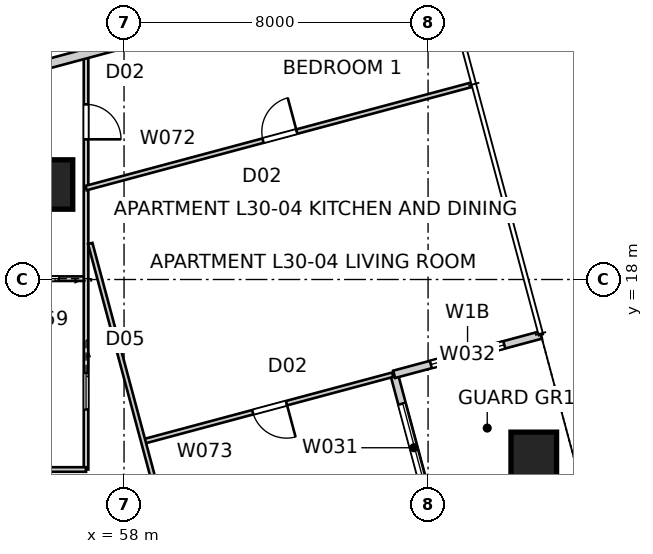
"""IFC4 building model, lengths in metres.
Left out: names, types, materials, properties, quantities, classifications, styles, units other than length and angle.
Written with IfcOpenShell. Run it as: python <this file> out.ifc"""

import sys

from ifc_helpers import new_model, si_unit, direction, frame, frame_2d, origin, origin_2d, place, context, subcontext, project, spatial, rectangle, extrude, element, fill, save


model = new_model("IFC4")
c1 = context("Model", 3, precision=1e-05, world=origin(), true_north=direction((0.0, 1.0)))
c2 = subcontext(c1, "Body", "Model", "MODEL_VIEW")
j1 = project(units=[si_unit("LENGTHUNIT", "METRE"), si_unit("PLANEANGLEUNIT", "RADIAN")], contexts=[c1])
p1 = place(None, origin())
s1 = spatial("IfcSite", under=j1, at=p1, CompositionType="ELEMENT")
p2 = place(p1, origin())
s2 = spatial("IfcBuilding", under=s1, at=p2, CompositionType="ELEMENT")
p3 = place(p2, frame((0.0, 0.0, 111.6)))
s3 = spatial("IfcBuildingStorey", under=s2, at=p3, CompositionType="ELEMENT", Elevation=111.6)
p4 = place(p3, frame((68.781, 13.383, -0.15), z_axis=(0.0, 0.0, 1.0), x_axis=(1.0, 0.0, 0.0)))
e1 = element("IfcColumn", 1, at=p4, inside=s3, PredefinedType="COLUMN", context=c2, shape_type="SweptSolid", body=[
    extrude(rectangle(XDim=1.2, YDim=1.2, at=origin_2d()), origin(), (0.0, 0.0, 1.0), 3.55),
])
p5 = place(p3, frame((56.0, 20.5, 0.0), z_axis=(0.0, 0.0, 1.0), x_axis=(1.0, 0.0, 0.0)))
e2 = element("IfcColumn", 2, at=p5, inside=s3, PredefinedType="COLUMN", context=c2, shape_type="SweptSolid", body=[
    extrude(rectangle(XDim=1.3, YDim=1.3, at=origin_2d()), origin(), (0.0, 0.0, 1.0), 3.4),
])
p6 = place(p3, frame((66.143, 11.641, 0.0), z_axis=(0.0, 0.0, 1.0), x_axis=(-0.258843877716, 0.965919172068, 0.0)))
e3 = element("IfcWall", 3, at=p6, inside=s3, PredefinedType="SOLIDWALL", context=c2, shape_type="SweptSolid", body=[
    extrude(rectangle(XDim=4.0, YDim=0.2, at=frame_2d((2.0, 0.0))), origin(), (0.0, 0.0, 1.0), 3.25),
])
p7 = place(p6, frame((0.8, 0.0, 0.0)))
e4 = element("IfcOpeningElement", 4, at=p7, cuts=e3, PredefinedType="OPENING", context=c2, shape_type="SweptSolid", body=[
    extrude(rectangle(XDim=2.4, YDim=2.1, at=frame_2d((1.2, 1.05))), frame((0.0, 0.11, 0.0), z_axis=(0.0, -1.0, 0.0), x_axis=(1.0, 0.0, 0.0)), (0.0, 0.0, 1.0), 0.22),
])
p8 = place(p3, frame((65.107, 15.504, 0.0), z_axis=(0.0, 0.0, 1.0), x_axis=(0.965934430412, 0.258786931944, 0.0)))
e5 = element("IfcWall", 5, at=p8, inside=s3, PredefinedType="SOLIDWALL", context=c2, shape_type="SweptSolid", body=[
    extrude(rectangle(XDim=4.0, YDim=0.2, at=frame_2d((2.0, 0.0))), origin(), (0.0, 0.0, 1.0), 3.25),
])
p9 = place(p8, frame((1.0, 0.0, 0.45)))
e6 = element("IfcOpeningElement", 6, at=p9, cuts=e5, PredefinedType="OPENING", context=c2, shape_type="SweptSolid", body=[
    extrude(rectangle(XDim=2.0, YDim=1.8, at=frame_2d((1.0, 0.9))), frame((0.0, 0.11, 0.0), z_axis=(0.0, -1.0, 0.0), x_axis=(1.0, 0.0, 0.0)), (0.0, 0.0, 1.0), 0.22),
])
p10 = place(p3, frame((56.242, 8.988, 0.0), z_axis=(0.0, 0.0, 1.0), x_axis=(-0.25880587229, 0.965929355837, 0.0)))
e7 = element("IfcWall", 7, at=p10, inside=s3, PredefinedType="PARTITIONING", context=c2, shape_type="SweptSolid", body=[
    extrude(rectangle(XDim=6.645, YDim=0.25, at=frame_2d((3.322, 0.0))), origin(), (0.0, 0.0, 1.0), 3.25),
])
p11 = place(p3, frame((66.318, 26.44, 0.0), z_axis=(0.0, 0.0, 1.0), x_axis=(-0.965924438766, -0.258824223352, 0.0)))
e8 = element("IfcWall", 8, at=p11, inside=s3, PredefinedType="PARTITIONING", context=c2, shape_type="SweptSolid", body=[
    extrude(rectangle(XDim=12.138, YDim=0.25, at=frame_2d((6.069, 0.0))), origin(), (0.0, 0.0, 1.0), 3.25),
])
p12 = place(p3, frame((57.0, 18.021, 0.0), z_axis=(0.0, 0.0, 1.0), x_axis=(-1.0, 0.0, 0.0)))
e9 = element("IfcWall", 9, at=p12, inside=s3, PredefinedType="PARTITIONING", context=c2, shape_type="SweptSolid", body=[
    extrude(rectangle(XDim=2.4, YDim=0.12, at=frame_2d((1.2, 0.0))), origin(), (0.0, 0.0, 1.0), 3.25),
])
p13 = place(p12, frame((0.72, 0.0, 0.0)))
e10 = element("IfcOpeningElement", 10, at=p13, cuts=e9, PredefinedType="OPENING", context=c2, shape_type="SweptSolid", body=[
    extrude(rectangle(XDim=0.96, YDim=2.1, at=frame_2d((0.48, 1.05))), frame((0.0, 0.07, 0.0), z_axis=(0.0, -1.0, 0.0), x_axis=(1.0, 0.0, 0.0)), (0.0, 0.0, 1.0), 0.14),
])
p14 = place(p3, frame((57.0, 47.0, 0.0), z_axis=(0.0, 0.0, 1.0), x_axis=(0.0, -1.0, 0.0)))
e11 = element("IfcWall", 11, at=p14, inside=s3, PredefinedType="PARTITIONING", context=c2, shape_type="SweptSolid", body=[
    extrude(rectangle(XDim=34.0, YDim=0.12, at=frame_2d((17.0, 0.0))), origin(), (0.0, 0.0, 1.0), 2.55),
])
p15 = place(p14, frame((8.23, 0.0, 0.0)))
e12 = element("IfcOpeningElement", 12, at=p15, cuts=e11, PredefinedType="OPENING", context=c2, shape_type="SweptSolid", body=[
    extrude(rectangle(XDim=0.92, YDim=2.34, at=frame_2d((0.46, 1.17))), frame((0.0, 0.07, 0.0), z_axis=(0.0, -1.0, 0.0), x_axis=(1.0, 0.0, 0.0)), (0.0, 0.0, 1.0), 0.14),
])
p16 = place(p14, frame((3.192, 0.0, 0.0)))
e13 = element("IfcOpeningElement", 13, at=p16, cuts=e11, PredefinedType="OPENING", context=c2, shape_type="SweptSolid", body=[
    extrude(rectangle(XDim=0.92, YDim=2.34, at=frame_2d((0.46, 1.17))), frame((0.0, 0.07, 0.0), z_axis=(0.0, -1.0, 0.0), x_axis=(1.0, 0.0, 0.0)), (0.0, 0.0, 1.0), 0.14),
])
p17 = place(p14, frame((24.391, 0.0, 0.0)))
e14 = element("IfcOpeningElement", 14, at=p17, cuts=e11, PredefinedType="OPENING", context=c2, shape_type="SweptSolid", body=[
    extrude(rectangle(XDim=0.92, YDim=2.34, at=frame_2d((0.46, 1.17))), frame((0.0, 0.07, 0.0), z_axis=(0.0, -1.0, 0.0), x_axis=(1.0, 0.0, 0.0)), (0.0, 0.0, 1.0), 0.14),
])
p18 = place(p14, frame((21.702, 0.0, 0.0)))
e15 = element("IfcOpeningElement", 15, at=p18, cuts=e11, PredefinedType="OPENING", context=c2, shape_type="SweptSolid", body=[
    extrude(rectangle(XDim=0.92, YDim=2.34, at=frame_2d((0.46, 1.17))), frame((0.0, 0.07, 0.0), z_axis=(0.0, -1.0, 0.0), x_axis=(1.0, 0.0, 0.0)), (0.0, 0.0, 1.0), 0.14),
])
p19 = place(p14, frame((31.459, 0.0, 0.0)))
e16 = element("IfcOpeningElement", 16, at=p19, cuts=e11, PredefinedType="OPENING", context=c2, shape_type="SweptSolid", body=[
    extrude(rectangle(XDim=0.96, YDim=2.1, at=frame_2d((0.48, 1.05))), frame((0.0, 0.07, 0.0), z_axis=(0.0, -1.0, 0.0), x_axis=(1.0, 0.0, 0.0)), (0.0, 0.0, 1.0), 0.14),
])
p20 = place(p14, frame((13.759, 0.0, 0.0)))
e17 = element("IfcOpeningElement", 17, at=p20, cuts=e11, PredefinedType="OPENING", context=c2, shape_type="SweptSolid", body=[
    extrude(rectangle(XDim=0.96, YDim=2.1, at=frame_2d((0.48, 1.05))), frame((0.0, 0.07, 0.0), z_axis=(0.0, -1.0, 0.0), x_axis=(1.0, 0.0, 0.0)), (0.0, 0.0, 1.0), 0.14),
])
p21 = place(p3, frame((57.0, 13.0, 0.0), z_axis=(0.0, 0.0, 1.0), x_axis=(-1.0, 0.0, 0.0)))
e18 = element("IfcWall", 18, at=p21, inside=s3, PredefinedType="PARTITIONING", context=c2, shape_type="SweptSolid", body=[
    extrude(rectangle(XDim=1.833, YDim=0.12, at=frame_2d((0.917, 0.0))), origin(), (0.0, 0.0, 1.0), 3.25),
])
p22 = place(p3, frame((57.0, 20.406, 0.0), z_axis=(0.0, 0.0, 1.0), x_axis=(0.9659257847, 0.258819200315, 0.0)))
e19 = element("IfcWall", 19, at=p22, inside=s3, PredefinedType="PARTITIONING", context=c2, shape_type="SweptSolid", body=[
    extrude(rectangle(XDim=10.522, YDim=0.12, at=frame_2d((5.261, 0.0))), origin(), (0.0, 0.0, 1.0), 2.722),
])
p23 = place(p22, frame((4.821, 0.0, 0.0)))
e20 = element("IfcOpeningElement", 20, at=p23, cuts=e19, PredefinedType="OPENING", context=c2, shape_type="SweptSolid", body=[
    extrude(rectangle(XDim=0.92, YDim=2.34, at=frame_2d((0.46, 1.17))), frame((0.0, 0.07, 0.0), z_axis=(0.0, -1.0, 0.0), x_axis=(1.0, 0.0, 0.0)), (0.0, 0.0, 1.0), 0.14),
])
p24 = place(p3, frame((65.069, 15.494, 0.0), z_axis=(0.0, 0.0, 1.0), x_axis=(-0.965922865286, -0.258830095464, 0.0)))
e21 = element("IfcWall", 21, at=p24, inside=s3, PredefinedType="PARTITIONING", context=c2, shape_type="SweptSolid", body=[
    extrude(rectangle(XDim=6.793, YDim=0.12, at=frame_2d((3.396, 0.0))), origin(), (0.0, 0.0, 1.0), 3.25),
])
p25 = place(p24, frame((2.892, 0.0, 0.0)))
e22 = element("IfcOpeningElement", 22, at=p25, cuts=e21, PredefinedType="OPENING", context=c2, shape_type="SweptSolid", body=[
    extrude(rectangle(XDim=0.92, YDim=2.34, at=frame_2d((0.46, 1.17))), frame((0.0, 0.07, 0.0), z_axis=(0.0, -1.0, 0.0), x_axis=(1.0, 0.0, 0.0)), (0.0, 0.0, 1.0), 0.14),
])
p26 = place(p3, frame((59.532, 9.911, 0.0), z_axis=(0.0, 0.0, 1.0), x_axis=(-0.25881390457, 0.965927203676, 0.0)))
e23 = element("IfcWall", 23, at=p26, inside=s3, PredefinedType="PARTITIONING", context=c2, shape_type="SweptSolid", body=[
    extrude(rectangle(XDim=9.357, YDim=0.12, at=frame_2d((4.678, 0.0))), origin(), (0.0, 0.0, 1.0), 2.638),
])
p27 = place(p7, origin())
e24 = element("IfcDoor", 24, at=p27, inside=s3, OperationType="SLIDING_TO_LEFT", PredefinedType="DOOR", context=c2, shape_type="SweptSolid", body=[
    extrude(rectangle(XDim=2.4, YDim=2.1, at=frame_2d((1.2, 1.05))), frame((0.0, 0.025, 0.0), z_axis=(0.0, -1.0, 0.0), x_axis=(1.0, 0.0, 0.0)), (0.0, 0.0, 1.0), 0.05),
])
fill(e4, e24)
p28 = place(p9, origin())
e25 = element("IfcWindow", 25, at=p28, inside=s3, PartitioningType="SINGLE_PANEL", PredefinedType="WINDOW", context=c2, shape_type="SweptSolid", body=[
    extrude(rectangle(XDim=2.0, YDim=1.8, at=frame_2d((1.0, 0.9))), frame((0.0, 0.03, 0.0), z_axis=(0.0, -1.0, 0.0), x_axis=(1.0, 0.0, 0.0)), (0.0, 0.0, 1.0), 0.06),
])
fill(e6, e25)
p29 = place(p17, origin())
e26 = element("IfcDoor", 26, at=p29, inside=s3, OperationType="SINGLE_SWING_RIGHT", PredefinedType="DOOR", context=c2, shape_type="SweptSolid", body=[
    extrude(rectangle(XDim=0.92, YDim=2.34, at=frame_2d((0.46, 1.17))), frame((0.0, 0.025, 0.0), z_axis=(0.0, -1.0, 0.0), x_axis=(1.0, 0.0, 0.0)), (0.0, 0.0, 1.0), 0.05),
])
fill(e14, e26)
p30 = place(p13, origin())
e27 = element("IfcDoor", 27, at=p30, inside=s3, OperationType="SLIDING_TO_LEFT", PredefinedType="DOOR", context=c2, shape_type="SweptSolid", body=[
    extrude(rectangle(XDim=0.96, YDim=2.1, at=frame_2d((0.48, 1.05))), frame((0.0, 0.025, 0.0), z_axis=(0.0, -1.0, 0.0), x_axis=(1.0, 0.0, 0.0)), (0.0, 0.0, 1.0), 0.05),
])
fill(e10, e27)
p31 = place(p19, origin())
e28 = element("IfcDoor", 28, at=p31, inside=s3, OperationType="SLIDING_TO_LEFT", PredefinedType="DOOR", context=c2, shape_type="SweptSolid", body=[
    extrude(rectangle(XDim=0.96, YDim=2.1, at=frame_2d((0.48, 1.05))), frame((0.0, 0.025, 0.0), z_axis=(0.0, -1.0, 0.0), x_axis=(1.0, 0.0, 0.0)), (0.0, 0.0, 1.0), 0.05),
])
fill(e16, e28)
p32 = place(p23, origin())
e29 = element("IfcDoor", 29, at=p32, inside=s3, OperationType="SINGLE_SWING_RIGHT", PredefinedType="DOOR", context=c2, shape_type="SweptSolid", body=[
    extrude(rectangle(XDim=0.92, YDim=2.34, at=frame_2d((0.46, 1.17))), frame((0.0, 0.025, 0.0), z_axis=(0.0, -1.0, 0.0), x_axis=(1.0, 0.0, 0.0)), (0.0, 0.0, 1.0), 0.05),
])
fill(e20, e29)
p33 = place(p25, origin())
e30 = element("IfcDoor", 30, at=p33, inside=s3, OperationType="SINGLE_SWING_LEFT", PredefinedType="DOOR", context=c2, shape_type="SweptSolid", body=[
    extrude(rectangle(XDim=0.92, YDim=2.34, at=frame_2d((0.46, 1.17))), frame((0.0, 0.025, 0.0), z_axis=(0.0, -1.0, 0.0), x_axis=(1.0, 0.0, 0.0)), (0.0, 0.0, 1.0), 0.05),
])
fill(e22, e30)
save(model, sys.argv[1])
